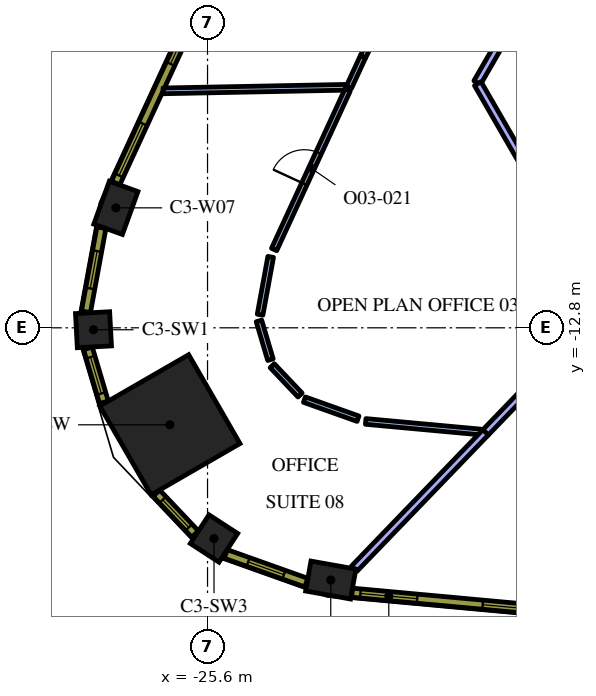
"""IFC4 building model, lengths in metres.
Left out: names, types, materials, properties, quantities, classifications, styles, units other than length and angle.
Written with IfcOpenShell. Run it as: python <this file> out.ifc"""

import sys

from ifc_helpers import new_model, si_unit, direction, frame, frame_2d, origin, origin_2d, place, context, subcontext, project, spatial, rectangle, extrude, element, fill, save


model = new_model("IFC4")
c1 = context("Model", 3, precision=1e-05, world=origin(), true_north=direction((0.0, 1.0)))
c2 = subcontext(c1, "Body", "Model", "MODEL_VIEW")
j1 = project(units=[si_unit("LENGTHUNIT", "METRE"), si_unit("PLANEANGLEUNIT", "RADIAN")], contexts=[c1])
p1 = place(None, origin())
s1 = spatial("IfcSite", under=j1, at=p1, CompositionType="ELEMENT")
p2 = place(p1, origin())
s2 = spatial("IfcBuilding", under=s1, at=p2, CompositionType="ELEMENT")
p3 = place(p2, frame((0.0, 0.0, 171.0)))
s3 = spatial("IfcBuildingStorey", under=s2, at=p3, CompositionType="ELEMENT", Elevation=171.0)
p4 = place(p3, frame((-26.591, -15.352, 0.0), z_axis=(0.0, 0.0, 1.0), x_axis=(-0.866025403784, -0.5, 0.0)))
e1 = element("IfcColumn", 1, at=p4, inside=s3, PredefinedType="COLUMN", context=c2, shape_type="SweptSolid", body=[
    extrude(rectangle(XDim=2.7, YDim=2.7, at=origin_2d()), origin(), (0.0, 0.0, 1.0), 4.2),
])
for number, where, z_axis, x_axis in (
    (2, (-22.357, -19.437, 0.0), (0.0, 0.0, 1.0), (0.985, -0.175, 0.0)),
    (3, (-28.012, -9.644, 0.0), (0.0, 0.0, 1.0), (-0.341, -0.94, 0.0)),
):
    element("IfcColumn", number, at=place(p3, frame(where, z_axis=z_axis, x_axis=x_axis)), inside=s3, PredefinedType="COLUMN", context=c2, shape_type="SweptSolid", body=[
        extrude(rectangle(XDim=1.2, YDim=0.8, at=origin_2d()), origin(), (0.0, 0.0, 1.0), 4.2),
    ])
for number, where, z_axis, x_axis in (
    (4, (-28.601, -12.851, 0.0), (0.0, 0.0, 1.0), (0.053, -0.999, 0.0)),
    (5, (-25.43, -18.344, 0.0), (0.0, 0.0, 1.0), (0.838, -0.546, 0.0)),
):
    element("IfcColumn", number, at=place(p3, frame(where, z_axis=z_axis, x_axis=x_axis)), inside=s3, PredefinedType="COLUMN", context=c2, shape_type="SweptSolid", body=[
        extrude(rectangle(XDim=0.9, YDim=0.9, at=origin_2d()), origin(), (0.0, 0.0, 1.0), 4.2),
    ])
p5 = place(p3, frame((-18.288, -15.557, 0.0), z_axis=(0.0, 0.0, 1.0), x_axis=(0.693944823318, 0.720028181525, 0.0)))
e6 = element("IfcWall", 6, at=p5, inside=s3, PredefinedType="PARTITIONING", context=c2, shape_type="SweptSolid", body=[
    extrude(rectangle(XDim=4.596, YDim=0.2, at=frame_2d((2.298, 0.0))), origin(), (0.0, 0.0, 1.0), 3.15),
])
p6 = place(p3, frame((-21.742, -19.14, 0.0), z_axis=(0.0, 0.0, 1.0), x_axis=(0.693986944276, 0.719987584042, 0.0)))
e7 = element("IfcWall", 7, at=p6, inside=s3, PredefinedType="PARTITIONING", context=c2, shape_type="SweptSolid", body=[
    extrude(rectangle(XDim=4.986, YDim=0.2, at=frame_2d((2.493, 0.0))), origin(), (0.0, 0.0, 1.0), 3.15),
])
p7 = place(p3, frame((-21.509, -5.666, 0.0), z_axis=(0.0, 0.0, 1.0), x_axis=(0.446192228952, 0.894937145739, 0.0)))
e8 = element("IfcWall", 8, at=p7, inside=s3, PredefinedType="PARTITIONING", context=c2, shape_type="SweptSolid", body=[
    extrude(rectangle(XDim=2.774, YDim=0.15, at=frame_2d((1.387, 0.0))), origin(), (0.0, 0.0, 1.0), 3.15),
])
p8 = place(p7, frame((0.973, 0.0, 0.0)))
e9 = element("IfcOpeningElement", 9, at=p8, cuts=e8, PredefinedType="OPENING", context=c2, shape_type="SweptSolid", body=[
    extrude(rectangle(XDim=0.9, YDim=2.1, at=frame_2d((0.45, 1.05))), frame((0.0, 0.085, 0.0), z_axis=(0.0, -1.0, 0.0), x_axis=(1.0, 0.0, 0.0)), (0.0, 0.0, 1.0), 0.17),
])
p9 = place(p3, frame((-21.509, -5.666, 0.0), z_axis=(0.0, 0.0, 1.0), x_axis=(-0.4188658149, -0.908048142506, 0.0)))
e10 = element("IfcWall", 10, at=p9, inside=s3, PredefinedType="PARTITIONING", context=c2, shape_type="SweptSolid", body=[
    extrude(rectangle(XDim=0.885, YDim=0.15, at=frame_2d((0.443, 0.0))), origin(), (0.0, 0.0, 1.0), 3.15),
])
p10 = place(p3, frame((-21.963, -6.472, 0.0), z_axis=(0.0, 0.0, 1.0), x_axis=(-0.999809788098, -0.019503528505, 0.0)))
e11 = element("IfcWall", 11, at=p10, inside=s3, PredefinedType="PARTITIONING", context=c2, shape_type="SweptSolid", body=[
    extrude(rectangle(XDim=4.807, YDim=0.15, at=frame_2d((2.403, 0.0))), origin(), (0.0, 0.0, 1.0), 3.15),
])
p11 = place(p3, frame((-18.412, -15.542, 0.0), z_axis=(0.0, 0.0, 1.0), x_axis=(-0.995812481052, 0.091419377496, 0.0)))
e12 = element("IfcWall", 12, at=p11, inside=s3, PredefinedType="PARTITIONING", context=c2, shape_type="SweptSolid", body=[
    extrude(rectangle(XDim=3.039, YDim=0.15, at=frame_2d((1.52, 0.0))), origin(), (0.0, 0.0, 1.0), 3.15),
])
p12 = place(p3, frame((-21.64, -15.192, 0.0), z_axis=(0.0, 0.0, 1.0), x_axis=(-0.942099140138, 0.335334475041, 0.0)))
e13 = element("IfcWall", 13, at=p12, inside=s3, PredefinedType="PARTITIONING", context=c2, shape_type="SweptSolid", body=[
    extrude(rectangle(XDim=1.498, YDim=0.15, at=frame_2d((0.749, 0.0))), origin(), (0.0, 0.0, 1.0), 3.15),
])
p13 = place(p3, frame((-23.165, -14.57, 0.0), z_axis=(0.0, 0.0, 1.0), x_axis=(-0.688049940621, 0.725663337375, 0.0)))
e14 = element("IfcWall", 14, at=p13, inside=s3, PredefinedType="PARTITIONING", context=c2, shape_type="SweptSolid", body=[
    extrude(rectangle(XDim=1.064, YDim=0.15, at=frame_2d((0.532, 0.0))), origin(), (0.0, 0.0, 1.0), 3.15),
])
p14 = place(p3, frame((-23.945, -13.638, 0.0), z_axis=(0.0, 0.0, 1.0), x_axis=(-0.284463225945, 0.9586869526, 0.0)))
e15 = element("IfcWall", 15, at=p14, inside=s3, PredefinedType="PARTITIONING", context=c2, shape_type="SweptSolid", body=[
    extrude(rectangle(XDim=1.064, YDim=0.15, at=frame_2d((0.532, 0.0))), origin(), (0.0, 0.0, 1.0), 3.15),
])
p15 = place(p3, frame((-24.217, -12.455, 0.0), z_axis=(0.0, 0.0, 1.0), x_axis=(0.180635934027, 0.983550028894, 0.0)))
e16 = element("IfcWall", 16, at=p15, inside=s3, PredefinedType="PARTITIONING", context=c2, shape_type="SweptSolid", body=[
    extrude(rectangle(XDim=1.546, YDim=0.15, at=frame_2d((0.773, 0.0))), origin(), (0.0, 0.0, 1.0), 3.15),
])
p16 = place(p3, frame((-23.848, -10.74, 0.0), z_axis=(0.0, 0.0, 1.0), x_axis=(0.418723219841, 0.908113905392, 0.0)))
e17 = element("IfcWall", 17, at=p16, inside=s3, PredefinedType="PARTITIONING", context=c2, shape_type="SweptSolid", body=[
    extrude(rectangle(XDim=4.623, YDim=0.15, at=frame_2d((2.311, 0.0))), origin(), (0.0, 0.0, 1.0), 3.15),
])
p17 = place(p16, frame((1.9, 0.0, 0.0)))
e18 = element("IfcOpeningElement", 18, at=p17, cuts=e17, PredefinedType="OPENING", context=c2, shape_type="SweptSolid", body=[
    extrude(rectangle(XDim=0.9, YDim=2.1, at=frame_2d((0.45, 1.05))), frame((0.0, 0.085, 0.0), z_axis=(0.0, -1.0, 0.0), x_axis=(1.0, 0.0, 0.0)), (0.0, 0.0, 1.0), 0.17),
])
p18 = place(p3, frame((-13.146, 2.931, 0.0), z_axis=(0.0, 0.0, 1.0), x_axis=(-0.499997861235, -0.866026638597, 0.0)))
e19 = element("IfcWall", 19, at=p18, inside=s3, PredefinedType="PARTITIONING", context=c2, shape_type="SweptSolid", body=[
    extrude(rectangle(XDim=10.717, YDim=0.2, at=frame_2d((5.359, 0.0))), origin(), (0.0, 0.0, 1.0), 3.15),
])
p19 = place(p18, frame((4.9, 0.0, 0.0)))
e20 = element("IfcOpeningElement", 20, at=p19, cuts=e19, PredefinedType="OPENING", context=c2, shape_type="SweptSolid", body=[
    extrude(rectangle(XDim=1.0, YDim=2.1, at=frame_2d((0.5, 1.05))), frame((0.0, 0.11, 0.0), z_axis=(0.0, -1.0, 0.0), x_axis=(1.0, 0.0, 0.0)), (0.0, 0.0, 1.0), 0.22),
])
p20 = place(p3, frame((-18.489, -6.376, 0.0), z_axis=(0.0, 0.0, 1.0), x_axis=(0.499989401968, -0.866031522475, 0.0)))
e21 = element("IfcWall", 21, at=p20, inside=s3, PredefinedType="PARTITIONING", context=c2, shape_type="SweptSolid", body=[
    extrude(rectangle(XDim=6.677, YDim=0.2, at=frame_2d((3.338, 0.0))), origin(), (0.0, 0.0, 1.0), 3.15),
])
p21 = place(p3, frame((-21.797, -19.77, 0.0), z_axis=(0.0, 0.0, 1.0), x_axis=(0.995808712151, -0.091460422067, 0.0)))
e22 = element("IfcWall", 22, at=p21, inside=s3, PredefinedType="SOLIDWALL", context=c2, shape_type="SweptSolid", body=[
    extrude(rectangle(XDim=5.213, YDim=0.24, at=frame_2d((2.606, 0.0))), origin(), (0.0, 0.0, 1.0), 3.95),
])
p22 = place(p21, frame((0.221, 0.0, 0.9)))
e23 = element("IfcOpeningElement", 23, at=p22, cuts=e22, PredefinedType="OPENING", context=c2, shape_type="SweptSolid", body=[
    extrude(rectangle(XDim=1.5, YDim=2.55, at=frame_2d((0.75, 1.275))), frame((0.0, 0.13, 0.0), z_axis=(0.0, -1.0, 0.0), x_axis=(1.0, 0.0, 0.0)), (0.0, 0.0, 1.0), 0.26),
])
p23 = place(p21, frame((3.452, 0.0, 0.9)))
e24 = element("IfcOpeningElement", 24, at=p23, cuts=e22, PredefinedType="OPENING", context=c2, shape_type="SweptSolid", body=[
    extrude(rectangle(XDim=1.5, YDim=2.55, at=frame_2d((0.75, 1.275))), frame((0.0, 0.13, 0.0), z_axis=(0.0, -1.0, 0.0), x_axis=(1.0, 0.0, 0.0)), (0.0, 0.0, 1.0), 0.26),
])
p24 = place(p3, frame((-25.837, -4.258, 0.0), z_axis=(0.0, 0.0, 1.0), x_axis=(-0.418722559465, -0.908114209885, 0.0)))
e25 = element("IfcWall", 25, at=p24, inside=s3, PredefinedType="SOLIDWALL", context=c2, shape_type="SweptSolid", body=[
    extrude(rectangle(XDim=5.213, YDim=0.24, at=frame_2d((2.606, 0.0))), origin(), (0.0, 0.0, 1.0), 3.95),
])
p25 = place(p24, frame((0.261, 0.0, 0.9)))
e26 = element("IfcOpeningElement", 26, at=p25, cuts=e25, PredefinedType="OPENING", context=c2, shape_type="SweptSolid", body=[
    extrude(rectangle(XDim=1.5, YDim=2.55, at=frame_2d((0.75, 1.275))), frame((0.0, 0.13, 0.0), z_axis=(0.0, -1.0, 0.0), x_axis=(1.0, 0.0, 0.0)), (0.0, 0.0, 1.0), 0.26),
])
p26 = place(p24, frame((3.492, 0.0, 0.9)))
e27 = element("IfcOpeningElement", 27, at=p26, cuts=e25, PredefinedType="OPENING", context=c2, shape_type="SweptSolid", body=[
    extrude(rectangle(XDim=1.5, YDim=2.55, at=frame_2d((0.75, 1.275))), frame((0.0, 0.13, 0.0), z_axis=(0.0, -1.0, 0.0), x_axis=(1.0, 0.0, 0.0)), (0.0, 0.0, 1.0), 0.26),
])
p27 = place(p3, frame((-28.393, -10.167, 0.0), z_axis=(0.0, 0.0, 1.0), x_axis=(-0.180737189259, -0.983531427265, 0.0)))
e28 = element("IfcWall", 28, at=p27, inside=s3, PredefinedType="SOLIDWALL", context=c2, shape_type="SweptSolid", body=[
    extrude(rectangle(XDim=2.25, YDim=0.24, at=frame_2d((1.125, 0.0))), origin(), (0.0, 0.0, 1.0), 3.95),
])
p28 = place(p27, frame((0.625, 0.0, 0.9)))
e29 = element("IfcOpeningElement", 29, at=p28, cuts=e28, PredefinedType="OPENING", context=c2, shape_type="SweptSolid", body=[
    extrude(rectangle(XDim=1.0, YDim=2.55, at=frame_2d((0.5, 1.275))), frame((0.0, 0.13, 0.0), z_axis=(0.0, -1.0, 0.0), x_axis=(1.0, 0.0, 0.0)), (0.0, 0.0, 1.0), 0.26),
])
p29 = place(p3, frame((-28.748, -13.34, 0.0), z_axis=(0.0, 0.0, 1.0), x_axis=(0.284413721403, -0.958701640281, 0.0)))
e30 = element("IfcWall", 30, at=p29, inside=s3, PredefinedType="SOLIDWALL", context=c2, shape_type="SweptSolid", body=[
    extrude(rectangle(XDim=1.482, YDim=0.24, at=frame_2d((0.741, 0.0))), origin(), (0.0, 0.0, 1.0), 3.95),
])
p30 = place(p29, frame((0.241, 0.0, 0.9)))
e31 = element("IfcOpeningElement", 31, at=p30, cuts=e30, PredefinedType="OPENING", context=c2, shape_type="SweptSolid", body=[
    extrude(rectangle(XDim=1.0, YDim=2.55, at=frame_2d((0.5, 1.275))), frame((0.0, 0.13, 0.0), z_axis=(0.0, -1.0, 0.0), x_axis=(1.0, 0.0, 0.0)), (0.0, 0.0, 1.0), 0.26),
])
p31 = place(p3, frame((-26.946, -17.151, 0.0), z_axis=(0.0, 0.0, 1.0), x_axis=(0.687986858937, -0.725723144133, 0.0)))
e32 = element("IfcWall", 32, at=p31, inside=s3, PredefinedType="SOLIDWALL", context=c2, shape_type="SweptSolid", body=[
    extrude(rectangle(XDim=1.481, YDim=0.24, at=frame_2d((0.741, 0.0))), origin(), (0.0, 0.0, 1.0), 3.95),
])
p32 = place(p31, frame((0.241, 0.0, 0.9)))
e33 = element("IfcOpeningElement", 33, at=p32, cuts=e32, PredefinedType="OPENING", context=c2, shape_type="SweptSolid", body=[
    extrude(rectangle(XDim=1.0, YDim=2.55, at=frame_2d((0.5, 1.275))), frame((0.0, 0.13, 0.0), z_axis=(0.0, -1.0, 0.0), x_axis=(1.0, 0.0, 0.0)), (0.0, 0.0, 1.0), 0.26),
])
p33 = place(p3, frame((-25.121, -18.751, 0.0), z_axis=(0.0, 0.0, 1.0), x_axis=(0.942099727267, -0.335332825539, 0.0)))
e34 = element("IfcWall", 34, at=p33, inside=s3, PredefinedType="SOLIDWALL", context=c2, shape_type="SweptSolid", body=[
    extrude(rectangle(XDim=2.25, YDim=0.24, at=frame_2d((1.125, 0.0))), origin(), (0.0, 0.0, 1.0), 3.95),
])
p34 = place(p33, frame((0.625, 0.0, 0.9)))
e35 = element("IfcOpeningElement", 35, at=p34, cuts=e34, PredefinedType="OPENING", context=c2, shape_type="SweptSolid", body=[
    extrude(rectangle(XDim=1.0, YDim=2.55, at=frame_2d((0.5, 1.275))), frame((0.0, 0.13, 0.0), z_axis=(0.0, -1.0, 0.0), x_axis=(1.0, 0.0, 0.0)), (0.0, 0.0, 1.0), 0.26),
])
p35 = place(p17, origin())
e36 = element("IfcDoor", 36, at=p35, inside=s3, OperationType="SINGLE_SWING_RIGHT", PredefinedType="DOOR", context=c2, shape_type="SweptSolid", body=[
    extrude(rectangle(XDim=0.9, YDim=2.1, at=frame_2d((0.45, 1.05))), frame((0.0, 0.025, 0.0), z_axis=(0.0, -1.0, 0.0), x_axis=(1.0, 0.0, 0.0)), (0.0, 0.0, 1.0), 0.05),
])
fill(e18, e36)
p36 = place(p22, origin())
e37 = element("IfcWindow", 37, at=p36, inside=s3, PartitioningType="SINGLE_PANEL", PredefinedType="WINDOW", context=c2, shape_type="SweptSolid", body=[
    extrude(rectangle(XDim=1.5, YDim=2.55, at=frame_2d((0.75, 1.275))), frame((0.0, 0.04, 0.0), z_axis=(0.0, -1.0, 0.0), x_axis=(1.0, 0.0, 0.0)), (0.0, 0.0, 1.0), 0.06),
])
fill(e23, e37)
p37 = place(p23, origin())
e38 = element("IfcWindow", 38, at=p37, inside=s3, PartitioningType="SINGLE_PANEL", PredefinedType="WINDOW", context=c2, shape_type="SweptSolid", body=[
    extrude(rectangle(XDim=1.5, YDim=2.55, at=frame_2d((0.75, 1.275))), frame((0.0, 0.04, 0.0), z_axis=(0.0, -1.0, 0.0), x_axis=(1.0, 0.0, 0.0)), (0.0, 0.0, 1.0), 0.06),
])
fill(e24, e38)
p38 = place(p25, origin())
e39 = element("IfcWindow", 39, at=p38, inside=s3, PartitioningType="SINGLE_PANEL", PredefinedType="WINDOW", context=c2, shape_type="SweptSolid", body=[
    extrude(rectangle(XDim=1.5, YDim=2.55, at=frame_2d((0.75, 1.275))), frame((0.0, 0.04, 0.0), z_axis=(0.0, -1.0, 0.0), x_axis=(1.0, 0.0, 0.0)), (0.0, 0.0, 1.0), 0.06),
])
fill(e26, e39)
p39 = place(p26, origin())
e40 = element("IfcWindow", 40, at=p39, inside=s3, PartitioningType="SINGLE_PANEL", PredefinedType="WINDOW", context=c2, shape_type="SweptSolid", body=[
    extrude(rectangle(XDim=1.5, YDim=2.55, at=frame_2d((0.75, 1.275))), frame((0.0, 0.04, 0.0), z_axis=(0.0, -1.0, 0.0), x_axis=(1.0, 0.0, 0.0)), (0.0, 0.0, 1.0), 0.06),
])
fill(e27, e40)
p40 = place(p28, origin())
e41 = element("IfcWindow", 41, at=p40, inside=s3, PartitioningType="SINGLE_PANEL", PredefinedType="WINDOW", context=c2, shape_type="SweptSolid", body=[
    extrude(rectangle(XDim=1.0, YDim=2.55, at=frame_2d((0.5, 1.275))), frame((0.0, 0.04, 0.0), z_axis=(0.0, -1.0, 0.0), x_axis=(1.0, 0.0, 0.0)), (0.0, 0.0, 1.0), 0.06),
])
fill(e29, e41)
p41 = place(p30, origin())
e42 = element("IfcWindow", 42, at=p41, inside=s3, PartitioningType="SINGLE_PANEL", PredefinedType="WINDOW", context=c2, shape_type="SweptSolid", body=[
    extrude(rectangle(XDim=1.0, YDim=2.55, at=frame_2d((0.5, 1.275))), frame((0.0, 0.04, 0.0), z_axis=(0.0, -1.0, 0.0), x_axis=(1.0, 0.0, 0.0)), (0.0, 0.0, 1.0), 0.06),
])
fill(e31, e42)
p42 = place(p32, origin())
e43 = element("IfcWindow", 43, at=p42, inside=s3, PartitioningType="SINGLE_PANEL", PredefinedType="WINDOW", context=c2, shape_type="SweptSolid", body=[
    extrude(rectangle(XDim=1.0, YDim=2.55, at=frame_2d((0.5, 1.275))), frame((0.0, 0.04, 0.0), z_axis=(0.0, -1.0, 0.0), x_axis=(1.0, 0.0, 0.0)), (0.0, 0.0, 1.0), 0.06),
])
fill(e33, e43)
p43 = place(p34, origin())
e44 = element("IfcWindow", 44, at=p43, inside=s3, PartitioningType="SINGLE_PANEL", PredefinedType="WINDOW", context=c2, shape_type="SweptSolid", body=[
    extrude(rectangle(XDim=1.0, YDim=2.55, at=frame_2d((0.5, 1.275))), frame((0.0, 0.04, 0.0), z_axis=(0.0, -1.0, 0.0), x_axis=(1.0, 0.0, 0.0)), (0.0, 0.0, 1.0), 0.06),
])
fill(e35, e44)
save(model, sys.argv[1])
